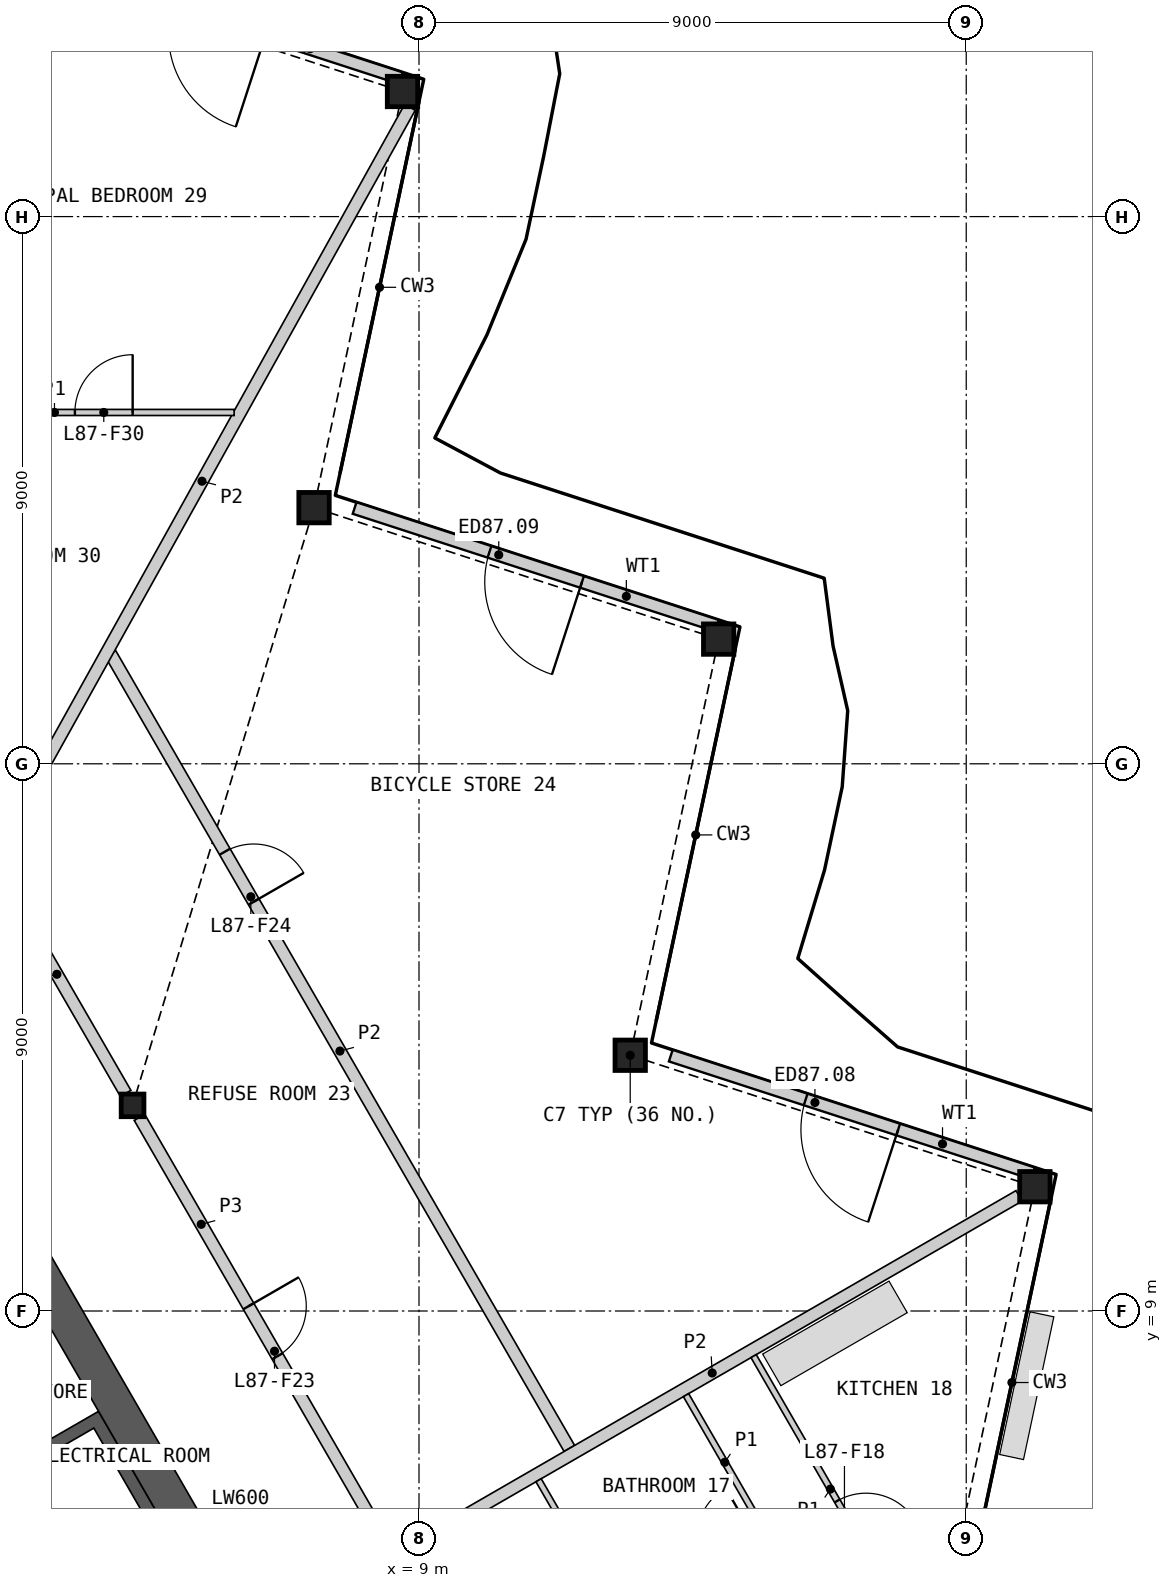
"""IFC4 building model, lengths in metres.
Left out: names, types, materials, properties, quantities, classifications, styles, units other than length and angle.
Written with IfcOpenShell. Run it as: python <this file> out.ifc"""

import sys

from ifc_helpers import new_model, si_unit, direction, frame, frame_2d, origin, origin_2d, place, context, subcontext, project, spatial, polyline, rectangle, hollow_rectangle, i_section, outline, extrude, element, fill, save


model = new_model("IFC4")
c1 = context("Model", 3, precision=1e-05, world=origin(), true_north=direction((0.0, 1.0)))
c2 = subcontext(c1, "Body", "Model", "MODEL_VIEW")
j1 = project(units=[si_unit("LENGTHUNIT", "METRE"), si_unit("PLANEANGLEUNIT", "RADIAN")], contexts=[c1])
p1 = place(None, origin())
s1 = spatial("IfcSite", under=j1, at=p1, CompositionType="ELEMENT")
p2 = place(p1, origin())
s2 = spatial("IfcBuilding", under=s1, at=p2, CompositionType="ELEMENT")
p3 = place(p2, frame((0.0, 0.0, 384.8)))
s3 = spatial("IfcBuildingStorey", under=s2, at=p3, CompositionType="ELEMENT", Elevation=384.8)
for number, where, z_axis, x_axis in (
    (1, (19.129, 11.044, 0.0), (0.0, 0.0, 1.0), (1.0, 0.0, 0.0)),
    (2, (12.474, 13.206, 0.0), (0.0, 0.0, 1.0), (1.0, 0.0, 0.0)),
    (3, (13.929, 20.051, 0.0), (0.0, 0.0, 1.0), (1.0, 0.0, 0.0)),
    (4, (7.274, 22.213, 0.0), (0.0, 0.0, 1.0), (1.0, 0.0, 0.0)),
    (5, (8.729, 29.057, 0.0), (0.0, 0.0, 1.0), (1.0, 0.0, 0.0)),
):
    element("IfcColumn", number, at=place(p3, frame(where, z_axis=z_axis, x_axis=x_axis)), inside=s3, PredefinedType="COLUMN", context=c2, shape_type="SweptSolid", body=[
        extrude(hollow_rectangle(XDim=0.5, YDim=0.5, WallThickness=0.03, at=origin_2d()), origin(), (0.0, 0.0, 1.0), 3.4),
    ])
p4 = place(p3, frame((4.289, 12.382, 0.0), z_axis=(0.0, 0.0, 1.0), x_axis=(1.0, 0.0, 0.0)))
e6 = element("IfcColumn", 6, at=p4, inside=s3, PredefinedType="COLUMN", context=c2, shape_type="SweptSolid", body=[
    extrude(i_section(OverallWidth=0.374, OverallDepth=0.372, WebThickness=0.016, FlangeThickness=0.026, at=origin_2d()), origin(), (0.0, 0.0, 1.0), 3.4),
])
p5 = place(p3, frame((19.099, 11.264, 0.0), z_axis=(0.0, 0.0, 1.0), x_axis=(-0.951056402988, 0.3090173431, 0.0)))
e7 = element("IfcWall", 7, at=p5, inside=s3, PredefinedType="SOLIDWALL", context=c2, shape_type="SweptSolid", body=[
    extrude(rectangle(XDim=6.265, YDim=0.2, at=frame_2d((3.133, 0.0))), origin(), (0.0, 0.0, 1.0), 2.634),
])
p6 = place(p5, frame((2.333, 0.0, 0.0)))
e8 = element("IfcOpeningElement", 8, at=p6, cuts=e7, PredefinedType="OPENING", context=c2, shape_type="SweptSolid", body=[
    extrude(rectangle(XDim=1.6, YDim=2.25, at=frame_2d((0.8, 1.125))), frame((0.0, 0.11, 0.0), z_axis=(0.0, -1.0, 0.0), x_axis=(1.0, 0.0, 0.0)), (0.0, 0.0, 1.0), 0.22),
])
p7 = place(p3, frame((13.899, 20.271, 0.0), z_axis=(0.0, 0.0, 1.0), x_axis=(-0.951056402988, 0.3090173431, 0.0)))
e9 = element("IfcWall", 9, at=p7, inside=s3, PredefinedType="SOLIDWALL", context=c2, shape_type="SweptSolid", body=[
    extrude(rectangle(XDim=6.265, YDim=0.2, at=frame_2d((3.133, 0.0))), origin(), (0.0, 0.0, 1.0), 2.634),
])
p8 = place(p7, frame((2.333, 0.0, 0.0)))
e10 = element("IfcOpeningElement", 10, at=p8, cuts=e9, PredefinedType="OPENING", context=c2, shape_type="SweptSolid", body=[
    extrude(rectangle(XDim=1.6, YDim=2.25, at=frame_2d((0.8, 1.125))), frame((0.0, 0.11, 0.0), z_axis=(0.0, -1.0, 0.0), x_axis=(1.0, 0.0, 0.0)), (0.0, 0.0, 1.0), 0.22),
])
p9 = place(p3, frame((8.699, 29.277, 0.0), z_axis=(0.0, 0.0, 1.0), x_axis=(-0.951048671744, 0.309041136379, 0.0)))
e11 = element("IfcWall", 11, at=p9, inside=s3, PredefinedType="SOLIDWALL", context=c2, shape_type="SweptSolid", body=[
    extrude(rectangle(XDim=6.265, YDim=0.2, at=frame_2d((3.133, 0.0))), origin(), (0.0, 0.0, 1.0), 2.634),
])
p10 = place(p9, frame((2.333, 0.0, 0.0)))
e12 = element("IfcOpeningElement", 12, at=p10, cuts=e11, PredefinedType="OPENING", context=c2, shape_type="SweptSolid", body=[
    extrude(rectangle(XDim=1.6, YDim=2.25, at=frame_2d((0.8, 1.125))), frame((0.0, 0.11, 0.0), z_axis=(0.0, -1.0, 0.0), x_axis=(1.0, 0.0, 0.0)), (0.0, 0.0, 1.0), 0.22),
])
p11 = place(p3, origin())
e13 = element("IfcWall", 13, at=p11, inside=s3, PredefinedType="SHEAR", context=c2, shape_type="SweptSolid", body=[
    extrude(outline(polyline([(1.561, 6.097), (3.731, 7.35), (8.231, -0.444), (6.061, -1.697), (5.96, -1.524), (7.952, -0.374), (6.952, 1.358), (4.96, 0.208), (4.861, 0.381), (6.852, 1.531), (5.852, 3.263), (3.861, 2.113), (3.76, 2.287), (5.752, 3.437), (4.752, 5.169), (2.76, 4.019), (2.66, 4.192), (4.652, 5.342), (3.652, 7.074), (1.66, 5.924), (1.561, 6.097)])), origin(), (0.0, 0.0, 1.0), 3.1),
])
p12 = place(p3, frame((5.817, -1.476, 0.0), z_axis=(0.0, 0.0, 1.0), x_axis=(-0.500002616675, 0.866023893041, 0.0)))
e14 = element("IfcWall", 14, at=p12, inside=s3, PredefinedType="SOLIDWALL", context=c2, shape_type="SweptSolid", body=[
    extrude(rectangle(XDim=8.373, YDim=0.2, at=frame_2d((4.187, 0.0))), origin(), (0.0, 0.0, 1.0), 3.1),
])
p13 = place(p12, frame((0.337, 0.0, 0.0)))
e15 = element("IfcOpeningElement", 15, at=p13, cuts=e14, PredefinedType="OPENING", context=c2, shape_type="SweptSolid", body=[
    extrude(rectangle(XDim=1.1, YDim=2.1, at=frame_2d((0.55, 1.05))), frame((0.0, 0.11, 0.0), z_axis=(0.0, -1.0, 0.0), x_axis=(1.0, 0.0, 0.0)), (0.0, 0.0, 1.0), 0.22),
])
p14 = place(p12, frame((2.537, 0.0, 0.0)))
e16 = element("IfcOpeningElement", 16, at=p14, cuts=e14, PredefinedType="OPENING", context=c2, shape_type="SweptSolid", body=[
    extrude(rectangle(XDim=1.1, YDim=2.1, at=frame_2d((0.55, 1.05))), frame((0.0, 0.11, 0.0), z_axis=(0.0, -1.0, 0.0), x_axis=(1.0, 0.0, 0.0)), (0.0, 0.0, 1.0), 0.22),
])
p15 = place(p12, frame((4.737, 0.0, 0.0)))
e17 = element("IfcOpeningElement", 17, at=p15, cuts=e14, PredefinedType="OPENING", context=c2, shape_type="SweptSolid", body=[
    extrude(rectangle(XDim=1.1, YDim=2.1, at=frame_2d((0.55, 1.05))), frame((0.0, 0.11, 0.0), z_axis=(0.0, -1.0, 0.0), x_axis=(1.0, 0.0, 0.0)), (0.0, 0.0, 1.0), 0.22),
])
p16 = place(p12, frame((7.037, 0.0, 0.0)))
e18 = element("IfcOpeningElement", 18, at=p16, cuts=e14, PredefinedType="OPENING", context=c2, shape_type="SweptSolid", body=[
    extrude(rectangle(XDim=0.9, YDim=2.1, at=frame_2d((0.45, 1.05))), frame((0.0, 0.11, 0.0), z_axis=(0.0, -1.0, 0.0), x_axis=(1.0, 0.0, 0.0)), (0.0, 0.0, 1.0), 0.22),
])
p17 = place(p3, frame((8.841, -0.902, 0.0), z_axis=(0.0, 0.0, 1.0), x_axis=(-0.499995618375, 0.866027933502, 0.0)))
e19 = element("IfcWall", 19, at=p17, inside=s3, PredefinedType="SHEAR", context=c2, shape_type="SweptSolid", body=[
    extrude(rectangle(XDim=14.571, YDim=0.6, at=frame_2d((7.285, 0.0))), origin(), (0.0, 0.0, 1.0), 3.1),
])
p18 = place(p3, frame((4.403, 12.185, 0.0), z_axis=(0.0, 0.0, 1.0), x_axis=(0.499992155518, -0.866029932751, 0.0)))
e20 = element("IfcWall", 20, at=p18, inside=s3, PredefinedType="PARTITIONING", context=c2, shape_type="SweptSolid", body=[
    extrude(rectangle(XDim=8.123, YDim=0.2, at=frame_2d((4.062, 0.0))), origin(), (0.0, 0.0, 1.0), 3.1),
])
p19 = place(p18, frame((3.587, 0.0, 0.0)))
e21 = element("IfcOpeningElement", 21, at=p19, cuts=e20, PredefinedType="OPENING", context=c2, shape_type="SweptSolid", body=[
    extrude(rectangle(XDim=0.95, YDim=2.1, at=frame_2d((0.475, 1.05))), frame((0.0, 0.11, 0.0), z_axis=(0.0, -1.0, 0.0), x_axis=(1.0, 0.0, 0.0)), (0.0, 0.0, 1.0), 0.22),
])
p20 = place(p3, frame((1.913, 16.498, 0.0), z_axis=(0.0, 0.0, 1.0), x_axis=(0.499974648164, -0.866040040179, 0.0)))
e22 = element("IfcWall", 22, at=p20, inside=s3, PredefinedType="PARTITIONING", context=c2, shape_type="SweptSolid", body=[
    extrude(rectangle(XDim=4.525, YDim=0.2, at=frame_2d((2.263, 0.0))), origin(), (0.0, 0.0, 1.0), 3.1),
])
p21 = place(p3, frame((3.926, 19.811, 0.0), z_axis=(0.0, 0.0, 1.0), x_axis=(0.500001082559, -0.866024778768, 0.0)))
e23 = element("IfcWall", 23, at=p21, inside=s3, PredefinedType="PARTITIONING", context=c2, shape_type="SweptSolid", body=[
    extrude(rectangle(XDim=15.094, YDim=0.2, at=frame_2d((7.547, 0.0))), origin(), (0.0, 0.0, 1.0), 2.33),
])
p22 = place(p21, frame((3.761, 0.0, 0.0)))
e24 = element("IfcOpeningElement", 24, at=p22, cuts=e23, PredefinedType="OPENING", context=c2, shape_type="SweptSolid", body=[
    extrude(rectangle(XDim=0.95, YDim=2.1, at=frame_2d((0.475, 1.05))), frame((0.0, 0.11, 0.0), z_axis=(0.0, -1.0, 0.0), x_axis=(1.0, 0.0, 0.0)), (0.0, 0.0, 1.0), 0.22),
])
p23 = place(p3, frame((2.012, 16.498, 0.0), z_axis=(0.0, 0.0, 1.0), x_axis=(0.485991996179, 0.873963259897, 0.0)))
e25 = element("IfcWall", 25, at=p23, inside=s3, PredefinedType="PARTITIONING", context=c2, shape_type="SweptSolid", body=[
    extrude(rectangle(XDim=14.073, YDim=0.2, at=frame_2d((7.036, 0.0))), origin(), (0.0, 0.0, 1.0), 2.33),
])
p24 = place(p3, frame((8.775, 5.066, 0.0), z_axis=(0.0, 0.0, 1.0), x_axis=(0.866023724155, 0.500002909193, 0.0)))
e26 = element("IfcWall", 26, at=p24, inside=s3, PredefinedType="PARTITIONING", context=c2, shape_type="SweptSolid", body=[
    extrude(rectangle(XDim=11.655, YDim=0.2, at=frame_2d((5.827, 0.0))), origin(), (0.0, 0.0, 1.0), 2.33),
])
p25 = place(p3, frame((0.05, 23.778, 0.0), z_axis=(0.0, 0.0, 1.0), x_axis=(1.0, 0.0, 0.0)))
e27 = element("IfcWall", 27, at=p25, inside=s3, PredefinedType="PARTITIONING", context=c2, shape_type="SweptSolid", body=[
    extrude(rectangle(XDim=5.91, YDim=0.1, at=frame_2d((2.955, 0.0))), origin(), (0.0, 0.0, 1.0), 2.33),
])
p26 = place(p25, frame((3.291, 0.0, 0.0)))
e28 = element("IfcOpeningElement", 28, at=p26, cuts=e27, PredefinedType="OPENING", context=c2, shape_type="SweptSolid", body=[
    extrude(rectangle(XDim=0.95, YDim=2.1, at=frame_2d((0.475, 1.05))), frame((0.0, 0.06, 0.0), z_axis=(0.0, -1.0, 0.0), x_axis=(1.0, 0.0, 0.0)), (0.0, 0.0, 1.0), 0.12),
])
p27 = place(p3, frame((14.503, 8.258, 0.0), z_axis=(0.0, 0.0, 1.0), x_axis=(0.500012591307, -0.866018134068, 0.0)))
e29 = element("IfcWall", 29, at=p27, inside=s3, PredefinedType="PARTITIONING", context=c2, shape_type="SweptSolid", body=[
    extrude(rectangle(XDim=5.05, YDim=0.1, at=frame_2d((2.525, 0.0))), origin(), (0.0, 0.0, 1.0), 2.33),
])
p28 = place(p27, frame((2.75, 0.0, 0.0)))
e30 = element("IfcOpeningElement", 30, at=p28, cuts=e29, PredefinedType="OPENING", context=c2, shape_type="SweptSolid", body=[
    extrude(rectangle(XDim=0.95, YDim=2.1, at=frame_2d((0.475, 1.05))), frame((0.0, 0.06, 0.0), z_axis=(0.0, -1.0, 0.0), x_axis=(1.0, 0.0, 0.0)), (0.0, 0.0, 1.0), 0.12),
])
for number, where, z_axis, x_axis in (
    (31, (10.967, 6.216, 0.0), (0.0, 0.0, 1.0), (0.5, -0.866, 0.0)),
    (32, (13.392, 7.616, 0.0), (0.0, 0.0, 1.0), (0.5, -0.866, 0.0)),
):
    element("IfcWall", number, at=place(p3, frame(where, z_axis=z_axis, x_axis=x_axis)), inside=s3, PredefinedType="PARTITIONING", context=c2, shape_type="SweptSolid", body=[
        extrude(rectangle(XDim=2.55, YDim=0.1, at=frame_2d((1.275, 0.0))), origin(), (0.0, 0.0, 1.0), 2.33),
    ])
p29 = place(p6, origin())
e33 = element("IfcDoor", 33, at=p29, inside=s3, OperationType="DOUBLE_DOOR_SINGLE_SWING", PredefinedType="DOOR", context=c2, shape_type="SweptSolid", body=[
    extrude(rectangle(XDim=1.6, YDim=2.25, at=frame_2d((0.8, 1.125))), frame((0.0, 0.025, 0.0), z_axis=(0.0, -1.0, 0.0), x_axis=(1.0, 0.0, 0.0)), (0.0, 0.0, 1.0), 0.05),
])
fill(e8, e33)
p30 = place(p8, origin())
e34 = element("IfcDoor", 34, at=p30, inside=s3, OperationType="DOUBLE_DOOR_SINGLE_SWING", PredefinedType="DOOR", context=c2, shape_type="SweptSolid", body=[
    extrude(rectangle(XDim=1.6, YDim=2.25, at=frame_2d((0.8, 1.125))), frame((0.0, 0.025, 0.0), z_axis=(0.0, -1.0, 0.0), x_axis=(1.0, 0.0, 0.0)), (0.0, 0.0, 1.0), 0.05),
])
fill(e10, e34)
p31 = place(p28, origin())
e35 = element("IfcDoor", 35, at=p31, inside=s3, OperationType="SINGLE_SWING_RIGHT", PredefinedType="DOOR", context=c2, shape_type="SweptSolid", body=[
    extrude(rectangle(XDim=0.95, YDim=2.1, at=frame_2d((0.475, 1.05))), frame((0.0, 0.025, 0.0), z_axis=(0.0, -1.0, 0.0), x_axis=(1.0, 0.0, 0.0)), (0.0, 0.0, 1.0), 0.05),
])
fill(e30, e35)
p32 = place(p19, origin())
e36 = element("IfcDoor", 36, at=p32, inside=s3, OperationType="SINGLE_SWING_LEFT", PredefinedType="DOOR", context=c2, shape_type="SweptSolid", body=[
    extrude(rectangle(XDim=0.95, YDim=2.1, at=frame_2d((0.475, 1.05))), frame((0.0, 0.025, 0.0), z_axis=(0.0, -1.0, 0.0), x_axis=(1.0, 0.0, 0.0)), (0.0, 0.0, 1.0), 0.05),
])
fill(e21, e36)
p33 = place(p22, origin())
e37 = element("IfcDoor", 37, at=p33, inside=s3, OperationType="SINGLE_SWING_RIGHT", PredefinedType="DOOR", context=c2, shape_type="SweptSolid", body=[
    extrude(rectangle(XDim=0.95, YDim=2.1, at=frame_2d((0.475, 1.05))), frame((0.0, 0.025, 0.0), z_axis=(0.0, -1.0, 0.0), x_axis=(1.0, 0.0, 0.0)), (0.0, 0.0, 1.0), 0.05),
])
fill(e24, e37)
p34 = place(p26, origin())
e38 = element("IfcDoor", 38, at=p34, inside=s3, OperationType="SINGLE_SWING_RIGHT", PredefinedType="DOOR", context=c2, shape_type="SweptSolid", body=[
    extrude(rectangle(XDim=0.95, YDim=2.1, at=frame_2d((0.475, 1.05))), frame((0.0, 0.025, 0.0), z_axis=(0.0, -1.0, 0.0), x_axis=(1.0, 0.0, 0.0)), (0.0, 0.0, 1.0), 0.05),
])
fill(e28, e38)
save(model, sys.argv[1])
